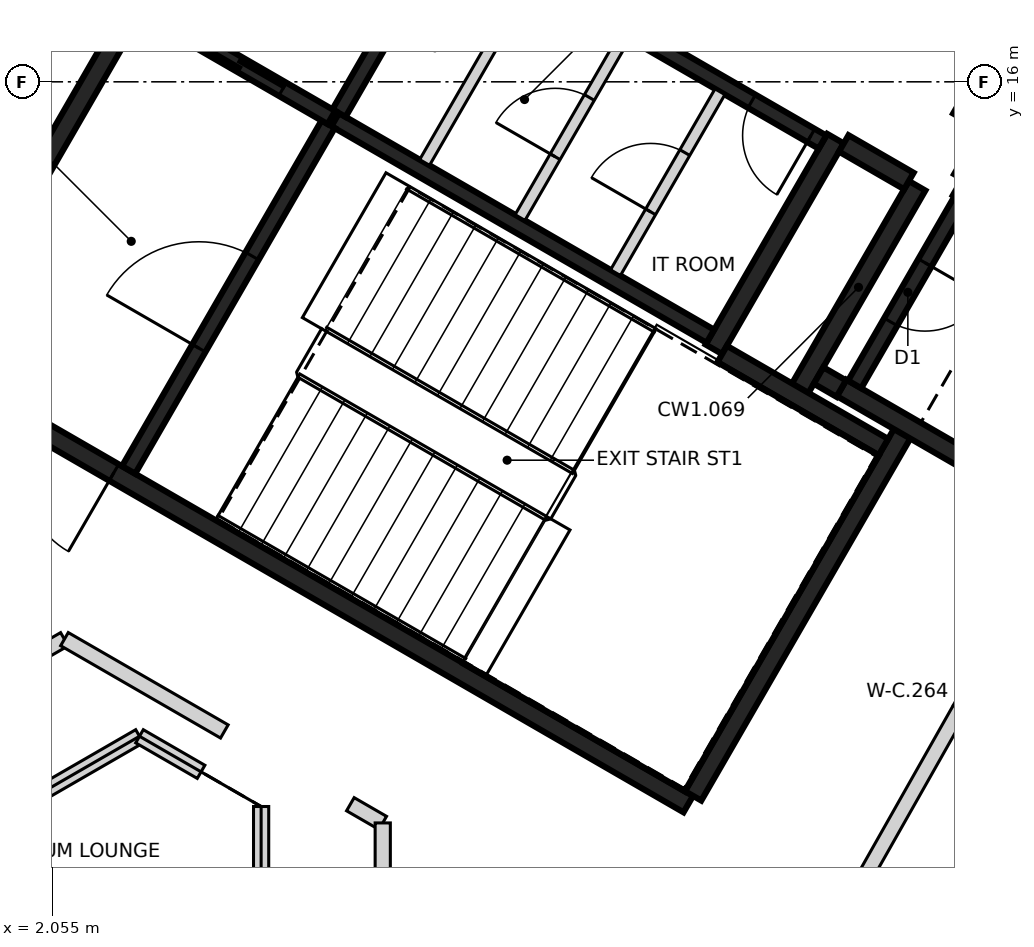
"""IFC4 building model, lengths in metres.
Left out: names, types, materials, properties, quantities, classifications, styles, units other than length and angle.
Written with IfcOpenShell. Run it as: python <this file> out.ifc"""

import sys

from ifc_helpers import new_model, si_unit, direction, frame, frame_2d, origin, place, context, subcontext, project, spatial, rectangle, extrude, element, fill, save


model = new_model("IFC4")
c1 = context("Model", 3, precision=1e-05, world=origin(), true_north=direction((0.0, 1.0)))
c2 = subcontext(c1, "Body", "Model", "MODEL_VIEW")
j1 = project(units=[si_unit("LENGTHUNIT", "METRE"), si_unit("PLANEANGLEUNIT", "RADIAN")], contexts=[c1])
p1 = place(None, origin())
s1 = spatial("IfcSite", under=j1, at=p1, CompositionType="ELEMENT")
p2 = place(p1, origin())
s2 = spatial("IfcBuilding", under=s1, at=p2, CompositionType="ELEMENT")
p3 = place(p2, frame((0.0, 0.0, 154.0)))
s3 = spatial("IfcBuildingStorey", under=s2, at=p3, CompositionType="ELEMENT", Elevation=154.0)
p4 = place(p3, frame((10.42, 6.498, 0.0), z_axis=(0.0, 0.0, 1.0), x_axis=(-0.866021906294, 0.500006057782, 0.0)))
e1 = element("IfcWall", 1, at=p4, inside=s3, PredefinedType="SHEAR", context=c2, shape_type="SweptSolid", body=[
    extrude(rectangle(XDim=11.55, YDim=0.25, at=frame_2d((5.775, 0.0))), origin(), (0.0, 0.0, 1.0), 3.2),
])
p5 = place(p4, frame((10.025, 0.0, 0.0)))
e2 = element("IfcOpeningElement", 2, at=p5, cuts=e1, PredefinedType="OPENING", context=c2, shape_type="SweptSolid", body=[
    extrude(rectangle(XDim=1.2, YDim=2.1, at=frame_2d((0.6, 1.05))), frame((0.0, 0.135, 0.0), z_axis=(0.0, -1.0, 0.0), x_axis=(1.0, 0.0, 0.0)), (0.0, 0.0, 1.0), 0.27),
])
p6 = place(p4, frame((8.725, 0.0, 0.0)))
e3 = element("IfcOpeningElement", 3, at=p6, cuts=e1, PredefinedType="OPENING", context=c2, shape_type="SweptSolid", body=[
    extrude(rectangle(XDim=1.2, YDim=2.1, at=frame_2d((0.6, 1.05))), frame((0.0, 0.135, 0.0), z_axis=(0.0, -1.0, 0.0), x_axis=(1.0, 0.0, 0.0)), (0.0, 0.0, 1.0), 0.27),
])
p7 = place(p3, frame((0.48, 12.381, 0.0), z_axis=(0.0, 0.0, 1.0), x_axis=(0.49999885962, 0.866026062182, 0.0)))
e4 = element("IfcWall", 4, at=p7, inside=s3, PredefinedType="SHEAR", context=c2, shape_type="SweptSolid", body=[
    extrude(rectangle(XDim=5.225, YDim=0.25, at=frame_2d((2.612, 0.0))), origin(), (0.0, 0.0, 1.0), 3.2),
])
p8 = place(p3, frame((13.238, 11.378, 0.0), z_axis=(0.0, 0.0, 1.0), x_axis=(-0.500008851346, -0.866020293397, 0.0)))
e5 = element("IfcWall", 5, at=p8, inside=s3, PredefinedType="SHEAR", context=c2, shape_type="SweptSolid", body=[
    extrude(rectangle(XDim=5.51, YDim=0.25, at=frame_2d((2.755, 0.0))), origin(), (0.0, 0.0, 1.0), 3.2),
])
p9 = place(p3, frame((12.357, 15.252, 0.0), z_axis=(0.0, 0.0, 1.0), x_axis=(-0.500028443584, -0.866008981251, 0.0)))
e6 = element("IfcWall", 6, at=p9, inside=s3, PredefinedType="SHEAR", context=c2, shape_type="SweptSolid", body=[
    extrude(rectangle(XDim=3.2, YDim=0.25, at=frame_2d((1.6, 0.0))), origin(), (0.0, 0.0, 1.0), 3.2),
])
p10 = place(p3, frame((14.918, 10.54, 0.0), z_axis=(0.0, 0.0, 1.0), x_axis=(-0.866063538972, 0.499933942099, 0.0)))
e7 = element("IfcWall", 7, at=p10, inside=s3, PredefinedType="SHEAR", context=c2, shape_type="SweptSolid", body=[
    extrude(rectangle(XDim=2.865, YDim=0.25, at=frame_2d((1.432, 0.0))), origin(), (0.0, 0.0, 1.0), 3.2),
])
p11 = place(p3, frame((13.963, 14.614, 0.0), z_axis=(0.0, 0.0, 1.0), x_axis=(0.866042235819, -0.499970844928, 0.0)))
e8 = element("IfcWall", 8, at=p11, inside=s3, PredefinedType="SHEAR", context=c2, shape_type="SweptSolid", body=[
    extrude(rectangle(XDim=2.865, YDim=0.25, at=frame_2d((1.432, 0.0))), origin(), (0.0, 0.0, 1.0), 3.2),
])
p12 = place(p3, frame((11.888, 11.961, 0.0), z_axis=(0.0, 0.0, 1.0), x_axis=(0.500003324108, 0.866023484601, 0.0)))
e9 = element("IfcWall", 9, at=p12, inside=s3, PredefinedType="SHEAR", context=c2, shape_type="SweptSolid", body=[
    extrude(rectangle(XDim=3.085, YDim=0.25, at=frame_2d((1.542, 0.0))), origin(), (0.0, 0.0, 1.0), 3.2),
])
p13 = place(p3, frame((10.865, 12.418, 0.0), z_axis=(0.0, 0.0, 1.0), x_axis=(0.866026229868, -0.499998569178, 0.0)))
e10 = element("IfcWall", 10, at=p13, inside=s3, PredefinedType="SHEAR", context=c2, shape_type="SweptSolid", body=[
    extrude(rectangle(XDim=2.449, YDim=0.25, at=frame_2d((1.225, 0.0))), origin(), (0.0, 0.0, 1.0), 3.2),
])
p14 = place(p3, frame((14.945, 17.135, 0.0), z_axis=(0.0, 0.0, 1.0), x_axis=(-0.499983108224, -0.866035156036, 0.0)))
e11 = element("IfcWall", 11, at=p14, inside=s3, PredefinedType="SHEAR", context=c2, shape_type="SweptSolid", body=[
    extrude(rectangle(XDim=1.865, YDim=0.25, at=frame_2d((0.932, 0.0))), origin(), (0.0, 0.0, 1.0), 3.2),
])
p15 = place(p14, frame((0.535, 0.0, 0.0)))
e12 = element("IfcOpeningElement", 12, at=p15, cuts=e11, PredefinedType="OPENING", context=c2, shape_type="SweptSolid", body=[
    extrude(rectangle(XDim=1.25, YDim=2.1, at=frame_2d((0.625, 1.05))), frame((0.0, 0.135, 0.0), z_axis=(0.0, -1.0, 0.0), x_axis=(1.0, 0.0, 0.0)), (0.0, 0.0, 1.0), 0.27),
])
p16 = place(p3, frame((13.322, 14.695, 0.0), z_axis=(0.0, 0.0, 1.0), x_axis=(-0.866017078145, 0.500014420154, 0.0)))
e13 = element("IfcWall", 13, at=p16, inside=s3, PredefinedType="SHEAR", context=c2, shape_type="SweptSolid", body=[
    extrude(rectangle(XDim=0.989, YDim=0.25, at=frame_2d((0.495, 0.0))), origin(), (0.0, 0.0, 1.0), 3.2),
])
p17 = place(p3, frame((14.368, 15.315, 0.0), z_axis=(0.0, 0.0, 1.0), x_axis=(-0.499897359611, -0.866084655132, 0.0)))
e14 = element("IfcWall", 14, at=p17, inside=s3, PredefinedType="SHEAR", context=c2, shape_type="SweptSolid", body=[
    extrude(rectangle(XDim=0.685, YDim=0.25, at=frame_2d((0.342, 0.0))), origin(), (0.0, 0.0, 1.0), 3.2),
])
p18 = place(p3, frame((12.433, 11.964, 0.0), z_axis=(0.0, 0.0, 1.0), x_axis=(-0.866055875208, 0.499947218231, 0.0)))
e15 = element("IfcWall", 15, at=p18, inside=s3, PredefinedType="SHEAR", context=c2, shape_type="SweptSolid", body=[
    extrude(rectangle(XDim=0.345, YDim=0.25, at=frame_2d((0.172, 0.0))), origin(), (0.0, 0.0, 1.0), 3.2),
])
p19 = place(p3, frame((5.775, 15.502, 0.0), z_axis=(0.0, 0.0, 1.0), x_axis=(0.866020080793, -0.500009219579, 0.0)))
e16 = element("IfcWall", 16, at=p19, inside=s3, PredefinedType="SHEAR", context=c2, shape_type="SweptSolid", body=[
    extrude(rectangle(XDim=5.699, YDim=0.2, at=frame_2d((2.85, 0.0))), origin(), (0.0, 0.0, 1.0), 3.2),
])
p20 = place(p3, frame((12.185, 15.207, 0.0), z_axis=(0.0, 0.0, 1.0), x_axis=(-0.866020080793, 0.500009219579, 0.0)))
e17 = element("IfcWall", 17, at=p20, inside=s3, PredefinedType="SHEAR", context=c2, shape_type="SweptSolid", body=[
    extrude(rectangle(XDim=5.699, YDim=0.2, at=frame_2d((2.85, 0.0))), origin(), (0.0, 0.0, 1.0), 3.2),
])
p21 = place(p20, frame((0.174, 0.0, 0.0)))
e18 = element("IfcOpeningElement", 18, at=p21, cuts=e17, PredefinedType="OPENING", context=c2, shape_type="SweptSolid", body=[
    extrude(rectangle(XDim=0.9, YDim=2.1, at=frame_2d((0.45, 1.05))), frame((0.0, 0.11, 0.0), z_axis=(0.0, -1.0, 0.0), x_axis=(1.0, 0.0, 0.0)), (0.0, 0.0, 1.0), 0.22),
])
p22 = place(p20, frame((4.599, 0.0, 0.0)))
e19 = element("IfcOpeningElement", 19, at=p22, cuts=e17, PredefinedType="OPENING", context=c2, shape_type="SweptSolid", body=[
    extrude(rectangle(XDim=0.9, YDim=2.1, at=frame_2d((0.45, 1.05))), frame((0.0, 0.11, 0.0), z_axis=(0.0, -1.0, 0.0), x_axis=(1.0, 0.0, 0.0)), (0.0, 0.0, 1.0), 0.22),
])
p23 = place(p3, frame((3.057, 10.895, 0.0), z_axis=(0.0, 0.0, 1.0), x_axis=(0.499989418164, 0.866031513124, 0.0)))
e20 = element("IfcWall", 20, at=p23, inside=s3, PredefinedType="SHEAR", context=c2, shape_type="SweptSolid", body=[
    extrude(rectangle(XDim=5.251, YDim=0.2, at=frame_2d((2.625, 0.0))), origin(), (0.0, 0.0, 1.0), 3.2),
])
p24 = place(p23, frame((1.849, 0.0, 0.0)))
e21 = element("IfcOpeningElement", 21, at=p24, cuts=e20, PredefinedType="OPENING", context=c2, shape_type="SweptSolid", body=[
    extrude(rectangle(XDim=1.4, YDim=2.1, at=frame_2d((0.7, 1.05))), frame((0.0, 0.11, 0.0), z_axis=(0.0, -1.0, 0.0), x_axis=(1.0, 0.0, 0.0)), (0.0, 0.0, 1.0), 0.22),
])
p25 = place(p3, frame((14.008, 14.442, 0.0), z_axis=(0.0, 0.0, 1.0), x_axis=(-0.499986818241, -0.866033014143, 0.0)))
e22 = element("IfcWall", 22, at=p25, inside=s3, PredefinedType="SHEAR", context=c2, shape_type="SweptSolid", body=[
    extrude(rectangle(XDim=2.798, YDim=0.2, at=frame_2d((1.399, 0.0))), origin(), (0.0, 0.0, 1.0), 3.2),
])
p26 = place(p25, frame((0.949, 0.0, 0.0)))
e23 = element("IfcOpeningElement", 23, at=p26, cuts=e22, PredefinedType="OPENING", context=c2, shape_type="SweptSolid", body=[
    extrude(rectangle(XDim=0.9, YDim=2.1, at=frame_2d((0.45, 1.05))), frame((0.0, 0.11, 0.0), z_axis=(0.0, -1.0, 0.0), x_axis=(1.0, 0.0, 0.0)), (0.0, 0.0, 1.0), 0.22),
])
p27 = place(p3, frame((7.199, 17.97, 0.0), z_axis=(0.0, 0.0, 1.0), x_axis=(-0.499968400327, -0.866043647095, 0.0)))
e24 = element("IfcWall", 24, at=p27, inside=s3, PredefinedType="SHEAR", context=c2, shape_type="SweptSolid", body=[
    extrude(rectangle(XDim=2.75, YDim=0.2, at=frame_2d((1.375, 0.0))), origin(), (0.0, 0.0, 1.0), 3.2),
])
p28 = place(p3, frame((5.725, 15.531, 0.0), z_axis=(0.0, 0.0, 1.0), x_axis=(-0.866037306777, 0.499979382845, 0.0)))
e25 = element("IfcWall", 25, at=p28, inside=s3, PredefinedType="SHEAR", context=c2, shape_type="SweptSolid", body=[
    extrude(rectangle(XDim=2.742, YDim=0.2, at=frame_2d((1.371, 0.0))), origin(), (0.0, 0.0, 1.0), 3.2),
])
p29 = place(p28, frame((0.743, 0.0, 0.0)))
e26 = element("IfcOpeningElement", 26, at=p29, cuts=e25, PredefinedType="OPENING", context=c2, shape_type="SweptSolid", body=[
    extrude(rectangle(XDim=1.3, YDim=2.1, at=frame_2d((0.65, 1.05))), frame((0.0, 0.11, 0.0), z_axis=(0.0, -1.0, 0.0), x_axis=(1.0, 0.0, 0.0)), (0.0, 0.0, 1.0), 0.22),
])
p30 = place(p3, frame((9.462, 13.489, 0.0), z_axis=(0.0, 0.0, 1.0), x_axis=(0.50002746344, 0.86600954718, 0.0)))
e27 = element("IfcWall", 27, at=p30, inside=s3, PredefinedType="PARTITIONING", context=c2, shape_type="SweptSolid", body=[
    extrude(rectangle(XDim=2.748, YDim=0.15, at=frame_2d((1.374, 0.0))), origin(), (0.0, 0.0, 1.0), 3.2),
])
p31 = place(p30, frame((0.924, 0.0, 0.0)))
e28 = element("IfcOpeningElement", 28, at=p31, cuts=e27, PredefinedType="OPENING", context=c2, shape_type="SweptSolid", body=[
    extrude(rectangle(XDim=0.9, YDim=2.1, at=frame_2d((0.45, 1.05))), frame((0.0, 0.085, 0.0), z_axis=(0.0, -1.0, 0.0), x_axis=(1.0, 0.0, 0.0)), (0.0, 0.0, 1.0), 0.17),
])
p32 = place(p3, frame((8.207, 14.214, 0.0), z_axis=(0.0, 0.0, 1.0), x_axis=(0.499922376475, 0.866070215109, 0.0)))
e29 = element("IfcWall", 29, at=p32, inside=s3, PredefinedType="PARTITIONING", context=c2, shape_type="SweptSolid", body=[
    extrude(rectangle(XDim=2.749, YDim=0.15, at=frame_2d((1.374, 0.0))), origin(), (0.0, 0.0, 1.0), 3.2),
])
p33 = place(p32, frame((0.924, 0.0, 0.0)))
e30 = element("IfcOpeningElement", 30, at=p33, cuts=e29, PredefinedType="OPENING", context=c2, shape_type="SweptSolid", body=[
    extrude(rectangle(XDim=0.9, YDim=2.1, at=frame_2d((0.45, 1.05))), frame((0.0, 0.085, 0.0), z_axis=(0.0, -1.0, 0.0), x_axis=(1.0, 0.0, 0.0)), (0.0, 0.0, 1.0), 0.17),
])
p34 = place(p3, frame((6.951, 14.939, 0.0), z_axis=(0.0, 0.0, 1.0), x_axis=(0.50002746344, 0.86600954718, 0.0)))
e31 = element("IfcWall", 31, at=p34, inside=s3, PredefinedType="PARTITIONING", context=c2, shape_type="SweptSolid", body=[
    extrude(rectangle(XDim=2.748, YDim=0.15, at=frame_2d((1.374, 0.0))), origin(), (0.0, 0.0, 1.0), 3.2),
])
p35 = place(p3, frame((-8.612, 2.418, 0.0), z_axis=(0.0, 0.0, 1.0), x_axis=(0.866019033094, 0.500011034197, 0.0)))
e32 = element("IfcWall", 32, at=p35, inside=s3, PredefinedType="PARTITIONING", context=c2, shape_type="SweptSolid", body=[
    extrude(rectangle(XDim=12.498, YDim=0.2, at=frame_2d((6.249, 0.0))), origin(), (0.0, 0.0, 1.0), 3.2),
])
p36 = place(p35, frame((9.346, 0.0, 0.0)))
e33 = element("IfcOpeningElement", 33, at=p36, cuts=e32, PredefinedType="OPENING", context=c2, shape_type="SweptSolid", body=[
    extrude(rectangle(XDim=0.9, YDim=2.1, at=frame_2d((0.45, 1.05))), frame((0.0, 0.11, 0.0), z_axis=(0.0, -1.0, 0.0), x_axis=(1.0, 0.0, 0.0)), (0.0, 0.0, 1.0), 0.22),
])
p37 = place(p35, frame((3.109, 0.0, 0.0)))
e34 = element("IfcOpeningElement", 34, at=p37, cuts=e32, PredefinedType="OPENING", context=c2, shape_type="SweptSolid", body=[
    extrude(rectangle(XDim=0.9, YDim=2.1, at=frame_2d((0.45, 1.05))), frame((0.0, 0.11, 0.0), z_axis=(0.0, -1.0, 0.0), x_axis=(1.0, 0.0, 0.0)), (0.0, 0.0, 1.0), 0.22),
])
p38 = place(p3, frame((2.213, 8.668, 0.0), z_axis=(0.0, 0.0, 1.0), x_axis=(0.866001461921, -0.500041466232, 0.0)))
e35 = element("IfcWall", 35, at=p38, inside=s3, PredefinedType="PARTITIONING", context=c2, shape_type="SweptSolid", body=[
    extrude(rectangle(XDim=2.429, YDim=0.2, at=frame_2d((1.214, 0.0))), origin(), (0.0, 0.0, 1.0), 2.3),
])
p39 = place(p3, frame((5.974, 6.496, 0.0), z_axis=(0.0, 0.0, 1.0), x_axis=(0.865788603161, -0.500409926597, 0.0)))
e36 = element("IfcWall", 36, at=p39, inside=s3, PredefinedType="PARTITIONING", context=c2, shape_type="SweptSolid", body=[
    extrude(rectangle(XDim=0.492, YDim=0.2, at=frame_2d((0.246, 0.0))), origin(), (0.0, 0.0, 1.0), 3.2),
])
p40 = place(p3, frame((6.4, -6.25, 0.0), z_axis=(0.0, 0.0, 1.0), x_axis=(0.0, 1.0, 0.0)))
e37 = element("IfcWall", 37, at=p40, inside=s3, PredefinedType="PARTITIONING", context=c2, shape_type="SweptSolid", body=[
    extrude(rectangle(XDim=12.5, YDim=0.2, at=frame_2d((6.25, 0.0))), origin(), (0.0, 0.0, 1.0), 3.2),
])
p41 = place(p40, frame((2.077, 0.0, 0.0)))
e38 = element("IfcOpeningElement", 38, at=p41, cuts=e37, PredefinedType="OPENING", context=c2, shape_type="SweptSolid", body=[
    extrude(rectangle(XDim=0.9, YDim=2.1, at=frame_2d((0.45, 1.05))), frame((0.0, 0.11, 0.0), z_axis=(0.0, -1.0, 0.0), x_axis=(1.0, 0.0, 0.0)), (0.0, 0.0, 1.0), 0.22),
])
p42 = place(p40, frame((8.315, 0.0, 0.0)))
e39 = element("IfcOpeningElement", 39, at=p42, cuts=e37, PredefinedType="OPENING", context=c2, shape_type="SweptSolid", body=[
    extrude(rectangle(XDim=0.9, YDim=2.1, at=frame_2d((0.45, 1.05))), frame((0.0, 0.11, 0.0), z_axis=(0.0, -1.0, 0.0), x_axis=(1.0, 0.0, 0.0)), (0.0, 0.0, 1.0), 0.22),
])
p43 = place(p3, frame((12.433, 4.992, 0.0), z_axis=(0.0, 0.0, 1.0), x_axis=(0.492572049538, 0.870271667937, 0.0)))
e40 = element("IfcWall", 40, at=p43, inside=s3, PredefinedType="PARTITIONING", context=c2, shape_type="SweptSolid", body=[
    extrude(rectangle(XDim=6.265, YDim=0.2, at=frame_2d((3.133, 0.0))), origin(), (0.0, 0.0, 1.0), 3.2),
])
p44 = place(p3, frame((-8.0, 0.925, 0.0), z_axis=(0.0, 0.0, 1.0), x_axis=(0.866075250037, 0.499913653818, 0.0)))
e41 = element("IfcWall", 41, at=p44, inside=s3, PredefinedType="PARTITIONING", context=c2, shape_type="SweptSolid", body=[
    extrude(rectangle(XDim=12.932, YDim=0.2, at=frame_2d((6.466, 0.0))), origin(), (0.0, 0.0, 1.0), 2.3),
])
p45 = place(p3, frame((3.2, 7.39, 0.0), z_axis=(0.0, 0.0, 1.0), x_axis=(0.865985641702, -0.500068863623, 0.0)))
e42 = element("IfcWall", 42, at=p45, inside=s3, PredefinedType="PARTITIONING", context=c2, shape_type="SweptSolid", body=[
    extrude(rectangle(XDim=0.935, YDim=0.2, at=frame_2d((0.468, 0.0))), origin(), (0.0, 0.0, 1.0), 2.3),
])
p46 = place(p3, frame((4.8, -6.466, 0.0), z_axis=(0.0, 0.0, 1.0), x_axis=(0.0, 1.0, 0.0)))
e43 = element("IfcWall", 43, at=p46, inside=s3, PredefinedType="PARTITIONING", context=c2, shape_type="SweptSolid", body=[
    extrude(rectangle(XDim=12.932, YDim=0.2, at=frame_2d((6.466, 0.0))), origin(), (0.0, 0.0, 1.0), 2.3),
])
p47 = place(p29, origin())
e44 = element("IfcDoor", 44, at=p47, inside=s3, OperationType="SLIDING_TO_RIGHT", PredefinedType="DOOR", context=c2, shape_type="SweptSolid", body=[
    extrude(rectangle(XDim=1.3, YDim=2.1, at=frame_2d((0.65, 1.05))), frame((0.0, 0.025, 0.0), z_axis=(0.0, -1.0, 0.0), x_axis=(1.0, 0.0, 0.0)), (0.0, 0.0, 1.0), 0.05),
])
fill(e26, e44)
p48 = place(p6, origin())
e45 = element("IfcDoor", 45, at=p48, inside=s3, OperationType="SINGLE_SWING_RIGHT", PredefinedType="DOOR", context=c2, shape_type="SweptSolid", body=[
    extrude(rectangle(XDim=1.2, YDim=2.1, at=frame_2d((0.6, 1.05))), frame((0.0, 0.025, 0.0), z_axis=(0.0, -1.0, 0.0), x_axis=(1.0, 0.0, 0.0)), (0.0, 0.0, 1.0), 0.05),
])
fill(e3, e45)
p49 = place(p24, origin())
e46 = element("IfcDoor", 46, at=p49, inside=s3, OperationType="SINGLE_SWING_RIGHT", PredefinedType="DOOR", context=c2, shape_type="SweptSolid", body=[
    extrude(rectangle(XDim=1.4, YDim=2.1, at=frame_2d((0.7, 1.05))), frame((0.0, 0.025, 0.0), z_axis=(0.0, -1.0, 0.0), x_axis=(1.0, 0.0, 0.0)), (0.0, 0.0, 1.0), 0.05),
])
fill(e21, e46)
p50 = place(p21, origin())
e47 = element("IfcDoor", 47, at=p50, inside=s3, OperationType="SINGLE_SWING_LEFT", PredefinedType="DOOR", context=c2, shape_type="SweptSolid", body=[
    extrude(rectangle(XDim=0.9, YDim=2.1, at=frame_2d((0.45, 1.05))), frame((0.0, 0.025, 0.0), z_axis=(0.0, -1.0, 0.0), x_axis=(1.0, 0.0, 0.0)), (0.0, 0.0, 1.0), 0.05),
])
fill(e18, e47)
p51 = place(p31, origin())
e48 = element("IfcDoor", 48, at=p51, inside=s3, OperationType="SINGLE_SWING_RIGHT", PredefinedType="DOOR", context=c2, shape_type="SweptSolid", body=[
    extrude(rectangle(XDim=0.9, YDim=2.1, at=frame_2d((0.45, 1.05))), frame((0.0, 0.025, 0.0), z_axis=(0.0, -1.0, 0.0), x_axis=(1.0, 0.0, 0.0)), (0.0, 0.0, 1.0), 0.05),
])
fill(e28, e48)
p52 = place(p33, origin())
e49 = element("IfcDoor", 49, at=p52, inside=s3, OperationType="SINGLE_SWING_LEFT", PredefinedType="DOOR", context=c2, shape_type="SweptSolid", body=[
    extrude(rectangle(XDim=0.9, YDim=2.1, at=frame_2d((0.45, 1.05))), frame((0.0, 0.025, 0.0), z_axis=(0.0, -1.0, 0.0), x_axis=(1.0, 0.0, 0.0)), (0.0, 0.0, 1.0), 0.05),
])
fill(e30, e49)
p53 = place(p26, origin())
e50 = element("IfcDoor", 50, at=p53, inside=s3, OperationType="SINGLE_SWING_LEFT", PredefinedType="DOOR", context=c2, shape_type="SweptSolid", body=[
    extrude(rectangle(XDim=0.9, YDim=2.1, at=frame_2d((0.45, 1.05))), frame((0.0, 0.025, 0.0), z_axis=(0.0, -1.0, 0.0), x_axis=(1.0, 0.0, 0.0)), (0.0, 0.0, 1.0), 0.05),
])
fill(e23, e50)
save(model, sys.argv[1])
